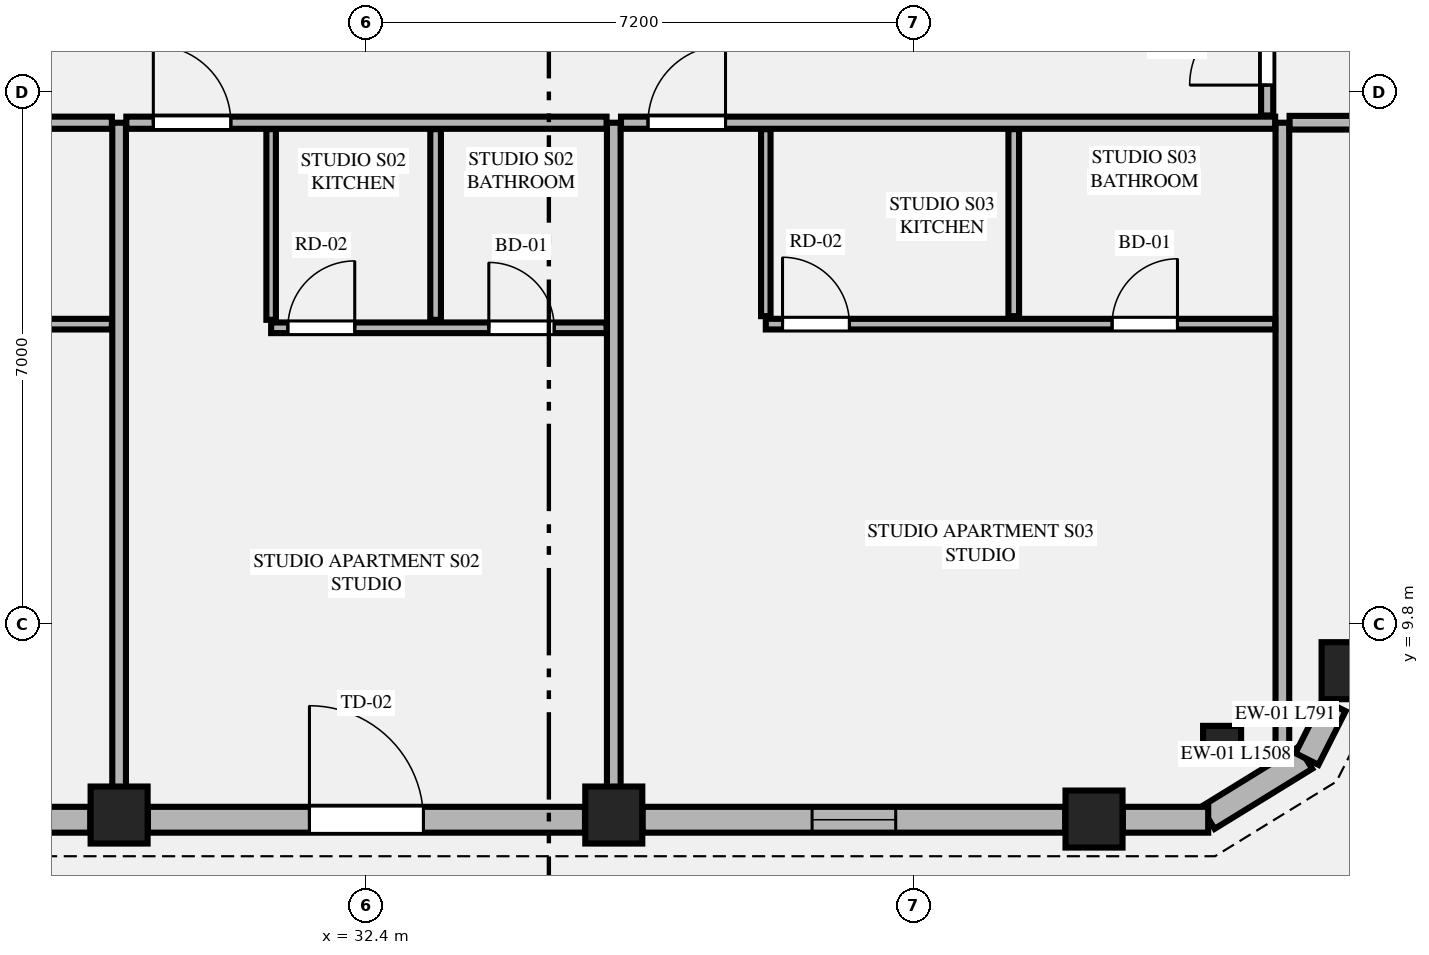
"""IFC4 building model, lengths in metres.
Left out: names, types, materials, properties, quantities, classifications, styles, units other than length and angle.
Written with IfcOpenShell. Run it as: python <this file> out.ifc"""

import sys

from ifc_helpers import new_model, si_unit, direction, frame, frame_2d, origin, origin_2d, place, context, subcontext, project, spatial, rectangle, extrude, element, fill, save


model = new_model("IFC4")
c1 = context("Model", 3, precision=1e-05, world=origin(), true_north=direction((0.0, 1.0)))
c2 = subcontext(c1, "Body", "Model", "MODEL_VIEW")
j1 = project(units=[si_unit("LENGTHUNIT", "METRE"), si_unit("PLANEANGLEUNIT", "RADIAN")], contexts=[c1])
p1 = place(None, origin())
s1 = spatial("IfcSite", under=j1, at=p1, CompositionType="ELEMENT")
p2 = place(p1, origin())
s2 = spatial("IfcBuilding", under=s1, at=p2, CompositionType="ELEMENT")
p3 = place(p2, frame((0.0, 0.0, 227.0)))
s3 = spatial("IfcBuildingStorey", under=s2, at=p3, CompositionType="ELEMENT", Elevation=227.0)
for number, where, z_axis, x_axis in (
    (1, (29.146, 7.292, 0.0), (0.0, 0.0, 1.0), (1.0, 0.0, 0.0)),
    (2, (35.654, 7.292, 0.0), (0.0, 0.0, 1.0), (1.0, 0.0, 0.0)),
    (3, (41.972, 7.239, 0.0), (0.0, 0.0, 1.0), (1.0, 0.0, 0.0)),
    (4, (45.341, 9.191, 0.0), (0.0, 0.0, 1.0), (1.0, 0.0, 0.0)),
):
    element("IfcColumn", number, at=place(p3, frame(where, z_axis=z_axis, x_axis=x_axis)), inside=s3, PredefinedType="COLUMN", context=c2, shape_type="SweptSolid", body=[
        extrude(rectangle(XDim=0.75, YDim=0.75, at=origin_2d()), origin(), (0.0, 0.0, 1.0), 3.65),
    ])
p4 = place(p3, frame((43.657, 8.215, 0.0), z_axis=(0.0, 0.0, 1.0), x_axis=(0.865256437757, 0.501329529272, 0.0)))
e5 = element("IfcColumn", 5, at=p4, inside=s3, PredefinedType="PILASTER", context=c2, shape_type="SweptSolid", body=[
    extrude(rectangle(XDim=0.5, YDim=0.35, at=origin_2d()), origin(), (0.0, 0.0, 1.0), 3.65),
])
p5 = place(p3, frame((43.469, 7.255, 0.0), z_axis=(0.0, 0.0, 1.0), x_axis=(0.851680557619, 0.52406128246, 0.0)))
e6 = element("IfcWall", 6, at=p5, inside=s3, PredefinedType="STANDARD", context=c2, shape_type="SweptSolid", body=[
    extrude(rectangle(XDim=1.508, YDim=0.34, at=frame_2d((0.754, 0.0))), origin(), (0.0, 0.0, 1.0), 3.45),
])
p6 = place(p3, frame((23.207, 7.23, 0.0), z_axis=(0.0, 0.0, 1.0), x_axis=(1.0, 0.0, 0.0)))
e7 = element("IfcWall", 7, at=p6, inside=s3, PredefinedType="STANDARD", context=c2, shape_type="SweptSolid", body=[
    extrude(rectangle(XDim=5.56, YDim=0.34, at=frame_2d((2.78, 0.0))), origin(), (0.0, 0.0, 1.0), 2.983),
])
p7 = place(p6, frame((2.08, 0.0, 0.75)))
e8 = element("IfcOpeningElement", 8, at=p7, cuts=e7, PredefinedType="OPENING", context=c2, shape_type="SweptSolid", body=[
    extrude(rectangle(XDim=1.4, YDim=2.05, at=frame_2d((0.7, 1.025))), frame((0.0, 0.18, 0.0), z_axis=(0.0, -1.0, 0.0), x_axis=(1.0, 0.0, 0.0)), (0.0, 0.0, 1.0), 0.36),
])
p8 = place(p3, frame((29.525, 7.23, 0.0), z_axis=(0.0, 0.0, 1.0), x_axis=(1.0, 0.0, 0.0)))
e9 = element("IfcWall", 9, at=p8, inside=s3, PredefinedType="STANDARD", context=c2, shape_type="SweptSolid", body=[
    extrude(rectangle(XDim=5.75, YDim=0.34, at=frame_2d((2.875, 0.0))), origin(), (0.0, 0.0, 1.0), 2.983),
])
p9 = place(p8, frame((2.125, 0.0, 0.0)))
e10 = element("IfcOpeningElement", 10, at=p9, cuts=e9, PredefinedType="OPENING", context=c2, shape_type="SweptSolid", body=[
    extrude(rectangle(XDim=1.5, YDim=2.3, at=frame_2d((0.75, 1.15))), frame((0.0, 0.18, 0.0), z_axis=(0.0, -1.0, 0.0), x_axis=(1.0, 0.0, 0.0)), (0.0, 0.0, 1.0), 0.36),
])
p10 = place(p3, frame((36.033, 7.23, 0.0), z_axis=(0.0, 0.0, 1.0), x_axis=(1.0, 0.0, 0.0)))
e11 = element("IfcWall", 11, at=p10, inside=s3, PredefinedType="STANDARD", context=c2, shape_type="SweptSolid", body=[
    extrude(rectangle(XDim=5.56, YDim=0.34, at=frame_2d((2.78, 0.0))), origin(), (0.0, 0.0, 1.0), 2.983),
])
p11 = place(p10, frame((2.23, 0.0, 0.75)))
e12 = element("IfcOpeningElement", 12, at=p11, cuts=e11, PredefinedType="OPENING", context=c2, shape_type="SweptSolid", body=[
    extrude(rectangle(XDim=1.1, YDim=2.0, at=frame_2d((0.55, 1.0))), frame((0.0, 0.18, 0.0), z_axis=(0.0, -1.0, 0.0), x_axis=(1.0, 0.0, 0.0)), (0.0, 0.0, 1.0), 0.36),
])
p12 = place(p3, frame((42.351, 7.23, 0.0), z_axis=(0.0, 0.0, 1.0), x_axis=(1.0, 0.0, 0.0)))
e13 = element("IfcWall", 13, at=p12, inside=s3, PredefinedType="STANDARD", context=c2, shape_type="SweptSolid", body=[
    extrude(rectangle(XDim=1.123, YDim=0.34, at=frame_2d((0.562, 0.0))), origin(), (0.0, 0.0, 1.0), 3.45),
])
p13 = place(p3, frame((44.773, 8.029, 0.0), z_axis=(0.0, 0.0, 1.0), x_axis=(0.451159191899, 0.892443490404, 0.0)))
e14 = element("IfcWall", 14, at=p13, inside=s3, PredefinedType="STANDARD", context=c2, shape_type="SweptSolid", body=[
    extrude(rectangle(XDim=0.791, YDim=0.34, at=frame_2d((0.396, 0.0))), origin(), (0.0, 0.0, 1.0), 3.45),
])
for number, where, z_axis, x_axis in (
    (15, (29.146, 7.405, 0.0), (0.0, 0.0, 1.0), (0.0, 1.0, 0.0)),
    (16, (35.654, 7.405, 0.0), (0.0, 0.0, 1.0), (0.0, 1.0, 0.0)),
):
    element("IfcWall", number, at=place(p3, frame(where, z_axis=z_axis, x_axis=x_axis)), inside=s3, PredefinedType="PARTITIONING", context=c2, shape_type="SweptSolid", body=[
        extrude(rectangle(XDim=8.995, YDim=0.18, at=frame_2d((4.498, 0.0))), origin(), (0.0, 0.0, 1.0), 2.907),
    ])
p14 = place(p3, frame((44.45, 8.119, 0.0), z_axis=(0.0, 0.0, 1.0), x_axis=(0.0, 1.0, 0.0)))
e17 = element("IfcWall", 17, at=p14, inside=s3, PredefinedType="PARTITIONING", context=c2, shape_type="SweptSolid", body=[
    extrude(rectangle(XDim=8.281, YDim=0.18, at=frame_2d((4.141, 0.0))), origin(), (0.0, 0.0, 1.0), 3.45),
])
p15 = place(p3, frame((20.445, 16.4, 0.0), z_axis=(0.0, 0.0, 1.0), x_axis=(1.0, 0.0, 0.0)))
e18 = element("IfcWall", 18, at=p15, inside=s3, PredefinedType="PARTITIONING", context=c2, shape_type="SweptSolid", body=[
    extrude(rectangle(XDim=8.606, YDim=0.16, at=frame_2d((4.303, 0.0))), origin(), (0.0, 0.0, 1.0), 3.45),
])
p16 = place(p15, frame((0.705, 0.0, 0.0)))
e19 = element("IfcOpeningElement", 19, at=p16, cuts=e18, PredefinedType="OPENING", context=c2, shape_type="SweptSolid", body=[
    extrude(rectangle(XDim=1.02, YDim=2.25, at=frame_2d((0.51, 1.125))), frame((0.0, 0.09, 0.0), z_axis=(0.0, -1.0, 0.0), x_axis=(1.0, 0.0, 0.0)), (0.0, 0.0, 1.0), 0.18),
])
p17 = place(p3, frame((22.7, 13.75, 0.0), z_axis=(0.0, 0.0, 1.0), x_axis=(1.0, 0.0, 0.0)))
e20 = element("IfcWall", 20, at=p17, inside=s3, PredefinedType="PLUMBINGWALL", context=c2, shape_type="SweptSolid", body=[
    extrude(rectangle(XDim=6.351, YDim=0.14, at=frame_2d((3.176, 0.0))), origin(), (0.0, 0.0, 1.0), 3.45),
])
p18 = place(p17, frame((4.298, 0.0, 0.0)))
e21 = element("IfcOpeningElement", 21, at=p18, cuts=e20, PredefinedType="OPENING", context=c2, shape_type="SweptSolid", body=[
    extrude(rectangle(XDim=0.86, YDim=2.1, at=frame_2d((0.43, 1.05))), frame((0.0, 0.08, 0.0), z_axis=(0.0, -1.0, 0.0), x_axis=(1.0, 0.0, 0.0)), (0.0, 0.0, 1.0), 0.16),
])
p19 = place(p17, frame((0.22, 0.0, 0.0)))
e22 = element("IfcOpeningElement", 22, at=p19, cuts=e20, PredefinedType="OPENING", context=c2, shape_type="SweptSolid", body=[
    extrude(rectangle(XDim=0.88, YDim=2.15, at=frame_2d((0.44, 1.075))), frame((0.0, 0.08, 0.0), z_axis=(0.0, -1.0, 0.0), x_axis=(1.0, 0.0, 0.0)), (0.0, 0.0, 1.0), 0.16),
])
p20 = place(p3, frame((29.241, 16.4, 0.0), z_axis=(0.0, 0.0, 1.0), x_axis=(1.0, 0.0, 0.0)))
e23 = element("IfcWall", 23, at=p20, inside=s3, PredefinedType="PARTITIONING", context=c2, shape_type="SweptSolid", body=[
    extrude(rectangle(XDim=6.318, YDim=0.16, at=frame_2d((3.159, 0.0))), origin(), (0.0, 0.0, 1.0), 3.45),
])
p21 = place(p20, frame((0.355, 0.0, 0.0)))
e24 = element("IfcOpeningElement", 24, at=p21, cuts=e23, PredefinedType="OPENING", context=c2, shape_type="SweptSolid", body=[
    extrude(rectangle(XDim=1.02, YDim=2.25, at=frame_2d((0.51, 1.125))), frame((0.0, 0.09, 0.0), z_axis=(0.0, -1.0, 0.0), x_axis=(1.0, 0.0, 0.0)), (0.0, 0.0, 1.0), 0.18),
])
p22 = place(p3, frame((31.146, 13.807, 0.0), z_axis=(0.0, 0.0, 1.0), x_axis=(0.0, 1.0, 0.0)))
e25 = element("IfcWall", 25, at=p22, inside=s3, PredefinedType="PARTITIONING", context=c2, shape_type="SweptSolid", body=[
    extrude(rectangle(XDim=2.508, YDim=0.125, at=frame_2d((1.254, 0.0))), origin(), (0.0, 0.0, 1.0), 3.45),
])
p23 = place(p3, frame((31.146, 13.702, 0.0), z_axis=(0.0, 0.0, 1.0), x_axis=(1.0, 0.0, 0.0)))
e26 = element("IfcWall", 26, at=p23, inside=s3, PredefinedType="PLUMBINGWALL", context=c2, shape_type="SweptSolid", body=[
    extrude(rectangle(XDim=4.413, YDim=0.14, at=frame_2d((2.207, 0.0))), origin(), (0.0, 0.0, 1.0), 3.45),
])
p24 = place(p23, frame((2.864, 0.0, 0.0)))
e27 = element("IfcOpeningElement", 27, at=p24, cuts=e26, PredefinedType="OPENING", context=c2, shape_type="SweptSolid", body=[
    extrude(rectangle(XDim=0.86, YDim=2.1, at=frame_2d((0.43, 1.05))), frame((0.0, 0.08, 0.0), z_axis=(0.0, -1.0, 0.0), x_axis=(1.0, 0.0, 0.0)), (0.0, 0.0, 1.0), 0.16),
])
p25 = place(p23, frame((0.22, 0.0, 0.0)))
e28 = element("IfcOpeningElement", 28, at=p25, cuts=e26, PredefinedType="OPENING", context=c2, shape_type="SweptSolid", body=[
    extrude(rectangle(XDim=0.88, YDim=2.15, at=frame_2d((0.44, 1.075))), frame((0.0, 0.08, 0.0), z_axis=(0.0, -1.0, 0.0), x_axis=(1.0, 0.0, 0.0)), (0.0, 0.0, 1.0), 0.16),
])
p26 = place(p3, frame((33.31, 13.807, 0.0), z_axis=(0.0, 0.0, 1.0), x_axis=(0.0, 1.0, 0.0)))
e29 = element("IfcWall", 29, at=p26, inside=s3, PredefinedType="PLUMBINGWALL", context=c2, shape_type="SweptSolid", body=[
    extrude(rectangle(XDim=2.508, YDim=0.14, at=frame_2d((1.254, 0.0))), origin(), (0.0, 0.0, 1.0), 3.45),
])
p27 = place(p3, frame((35.749, 16.4, 0.0), z_axis=(0.0, 0.0, 1.0), x_axis=(1.0, 0.0, 0.0)))
e30 = element("IfcWall", 30, at=p27, inside=s3, PredefinedType="PARTITIONING", context=c2, shape_type="SweptSolid", body=[
    extrude(rectangle(XDim=8.606, YDim=0.16, at=frame_2d((4.303, 0.0))), origin(), (0.0, 0.0, 1.0), 3.45),
])
p28 = place(p27, frame((0.355, 0.0, 0.0)))
e31 = element("IfcOpeningElement", 31, at=p28, cuts=e30, PredefinedType="OPENING", context=c2, shape_type="SweptSolid", body=[
    extrude(rectangle(XDim=1.02, YDim=2.25, at=frame_2d((0.51, 1.125))), frame((0.0, 0.09, 0.0), z_axis=(0.0, -1.0, 0.0), x_axis=(1.0, 0.0, 0.0)), (0.0, 0.0, 1.0), 0.18),
])
p29 = place(p3, frame((37.654, 13.855, 0.0), z_axis=(0.0, 0.0, 1.0), x_axis=(0.0, 1.0, 0.0)))
e32 = element("IfcWall", 32, at=p29, inside=s3, PredefinedType="PARTITIONING", context=c2, shape_type="SweptSolid", body=[
    extrude(rectangle(XDim=2.46, YDim=0.125, at=frame_2d((1.23, 0.0))), origin(), (0.0, 0.0, 1.0), 3.45),
])
p30 = place(p3, frame((37.654, 13.75, 0.0), z_axis=(0.0, 0.0, 1.0), x_axis=(1.0, 0.0, 0.0)))
e33 = element("IfcWall", 33, at=p30, inside=s3, PredefinedType="PLUMBINGWALL", context=c2, shape_type="SweptSolid", body=[
    extrude(rectangle(XDim=6.701, YDim=0.14, at=frame_2d((3.351, 0.0))), origin(), (0.0, 0.0, 1.0), 3.45),
])
p31 = place(p30, frame((4.556, 0.0, 0.0)))
e34 = element("IfcOpeningElement", 34, at=p31, cuts=e33, PredefinedType="OPENING", context=c2, shape_type="SweptSolid", body=[
    extrude(rectangle(XDim=0.86, YDim=2.1, at=frame_2d((0.43, 1.05))), frame((0.0, 0.08, 0.0), z_axis=(0.0, -1.0, 0.0), x_axis=(1.0, 0.0, 0.0)), (0.0, 0.0, 1.0), 0.16),
])
p32 = place(p30, frame((0.22, 0.0, 0.0)))
e35 = element("IfcOpeningElement", 35, at=p32, cuts=e33, PredefinedType="OPENING", context=c2, shape_type="SweptSolid", body=[
    extrude(rectangle(XDim=0.88, YDim=2.15, at=frame_2d((0.44, 1.075))), frame((0.0, 0.08, 0.0), z_axis=(0.0, -1.0, 0.0), x_axis=(1.0, 0.0, 0.0)), (0.0, 0.0, 1.0), 0.16),
])
p33 = place(p3, frame((40.916, 13.855, 0.0), z_axis=(0.0, 0.0, 1.0), x_axis=(0.0, 1.0, 0.0)))
e36 = element("IfcWall", 36, at=p33, inside=s3, PredefinedType="PLUMBINGWALL", context=c2, shape_type="SweptSolid", body=[
    extrude(rectangle(XDim=2.46, YDim=0.14, at=frame_2d((1.23, 0.0))), origin(), (0.0, 0.0, 1.0), 3.45),
])
p34 = place(p3, frame((44.545, 16.4, 0.0), z_axis=(0.0, 0.0, 1.0), x_axis=(1.0, 0.0, 0.0)))
e37 = element("IfcWall", 37, at=p34, inside=s3, PredefinedType="PARTITIONING", context=c2, shape_type="SweptSolid", body=[
    extrude(rectangle(XDim=4.221, YDim=0.18, at=frame_2d((2.111, 0.0))), origin(), (0.0, 0.0, 1.0), 3.45),
])
p35 = place(p3, frame((44.25, 16.495, 0.0), z_axis=(0.0, 0.0, 1.0), x_axis=(0.0, 1.0, 0.0)))
e38 = element("IfcWall", 38, at=p35, inside=s3, PredefinedType="PARTITIONING", context=c2, shape_type="SweptSolid", body=[
    extrude(rectangle(XDim=9.482, YDim=0.16, at=frame_2d((4.741, 0.0))), origin(), (0.0, 0.0, 1.0), 3.137),
])
p36 = place(p35, frame((0.4, 0.0, 0.0)))
e39 = element("IfcOpeningElement", 39, at=p36, cuts=e38, PredefinedType="OPENING", context=c2, shape_type="SweptSolid", body=[
    extrude(rectangle(XDim=1.02, YDim=2.25, at=frame_2d((0.51, 1.125))), frame((0.0, 0.09, 0.0), z_axis=(0.0, -1.0, 0.0), x_axis=(1.0, 0.0, 0.0)), (0.0, 0.0, 1.0), 0.18),
])
p37 = place(p9, origin())
e40 = element("IfcDoor", 40, at=p37, inside=s3, OperationType="SINGLE_SWING_LEFT", PredefinedType="DOOR", context=c2, shape_type="SweptSolid", body=[
    extrude(rectangle(XDim=1.5, YDim=2.3, at=frame_2d((0.75, 1.15))), frame((0.0, 0.025, 0.0), z_axis=(0.0, -1.0, 0.0), x_axis=(1.0, 0.0, 0.0)), (0.0, 0.0, 1.0), 0.05),
])
fill(e10, e40)
p38 = place(p11, origin())
e41 = element("IfcWindow", 41, at=p38, inside=s3, PartitioningType="SINGLE_PANEL", PredefinedType="WINDOW", context=c2, shape_type="SweptSolid", body=[
    extrude(rectangle(XDim=1.1, YDim=2.0, at=frame_2d((0.55, 1.0))), frame((0.0, 0.03, 0.0), z_axis=(0.0, -1.0, 0.0), x_axis=(1.0, 0.0, 0.0)), (0.0, 0.0, 1.0), 0.06),
])
fill(e12, e41)
p39 = place(p24, origin())
e42 = element("IfcDoor", 42, at=p39, inside=s3, OperationType="SINGLE_SWING_LEFT", PredefinedType="DOOR", context=c2, shape_type="SweptSolid", body=[
    extrude(rectangle(XDim=0.86, YDim=2.1, at=frame_2d((0.43, 1.05))), frame((0.0, 0.025, 0.0), z_axis=(0.0, -1.0, 0.0), x_axis=(1.0, 0.0, 0.0)), (0.0, 0.0, 1.0), 0.05),
])
fill(e27, e42)
p40 = place(p21, origin())
e43 = element("IfcDoor", 43, at=p40, inside=s3, OperationType="SINGLE_SWING_LEFT", PredefinedType="DOOR", context=c2, shape_type="SweptSolid", body=[
    extrude(rectangle(XDim=1.02, YDim=2.25, at=frame_2d((0.51, 1.125))), frame((0.0, 0.025, 0.0), z_axis=(0.0, -1.0, 0.0), x_axis=(1.0, 0.0, 0.0)), (0.0, 0.0, 1.0), 0.05),
])
fill(e24, e43)
p41 = place(p25, origin())
e44 = element("IfcDoor", 44, at=p41, inside=s3, OperationType="SINGLE_SWING_RIGHT", PredefinedType="DOOR", context=c2, shape_type="SweptSolid", body=[
    extrude(rectangle(XDim=0.88, YDim=2.15, at=frame_2d((0.44, 1.075))), frame((0.0, 0.025, 0.0), z_axis=(0.0, -1.0, 0.0), x_axis=(1.0, 0.0, 0.0)), (0.0, 0.0, 1.0), 0.05),
])
fill(e28, e44)
p42 = place(p31, origin())
e45 = element("IfcDoor", 45, at=p42, inside=s3, OperationType="SINGLE_SWING_RIGHT", PredefinedType="DOOR", context=c2, shape_type="SweptSolid", body=[
    extrude(rectangle(XDim=0.86, YDim=2.1, at=frame_2d((0.43, 1.05))), frame((0.0, 0.025, 0.0), z_axis=(0.0, -1.0, 0.0), x_axis=(1.0, 0.0, 0.0)), (0.0, 0.0, 1.0), 0.05),
])
fill(e34, e45)
p43 = place(p28, origin())
e46 = element("IfcDoor", 46, at=p43, inside=s3, OperationType="SINGLE_SWING_RIGHT", PredefinedType="DOOR", context=c2, shape_type="SweptSolid", body=[
    extrude(rectangle(XDim=1.02, YDim=2.25, at=frame_2d((0.51, 1.125))), frame((0.0, 0.025, 0.0), z_axis=(0.0, -1.0, 0.0), x_axis=(1.0, 0.0, 0.0)), (0.0, 0.0, 1.0), 0.05),
])
fill(e31, e46)
p44 = place(p32, origin())
e47 = element("IfcDoor", 47, at=p44, inside=s3, OperationType="SINGLE_SWING_LEFT", PredefinedType="DOOR", context=c2, shape_type="SweptSolid", body=[
    extrude(rectangle(XDim=0.88, YDim=2.15, at=frame_2d((0.44, 1.075))), frame((0.0, 0.025, 0.0), z_axis=(0.0, -1.0, 0.0), x_axis=(1.0, 0.0, 0.0)), (0.0, 0.0, 1.0), 0.05),
])
fill(e35, e47)
p45 = place(p36, origin())
e48 = element("IfcDoor", 48, at=p45, inside=s3, OperationType="SINGLE_SWING_LEFT", PredefinedType="DOOR", context=c2, shape_type="SweptSolid", body=[
    extrude(rectangle(XDim=1.02, YDim=2.25, at=frame_2d((0.51, 1.125))), frame((0.0, 0.025, 0.0), z_axis=(0.0, -1.0, 0.0), x_axis=(1.0, 0.0, 0.0)), (0.0, 0.0, 1.0), 0.05),
])
fill(e39, e48)
save(model, sys.argv[1])
